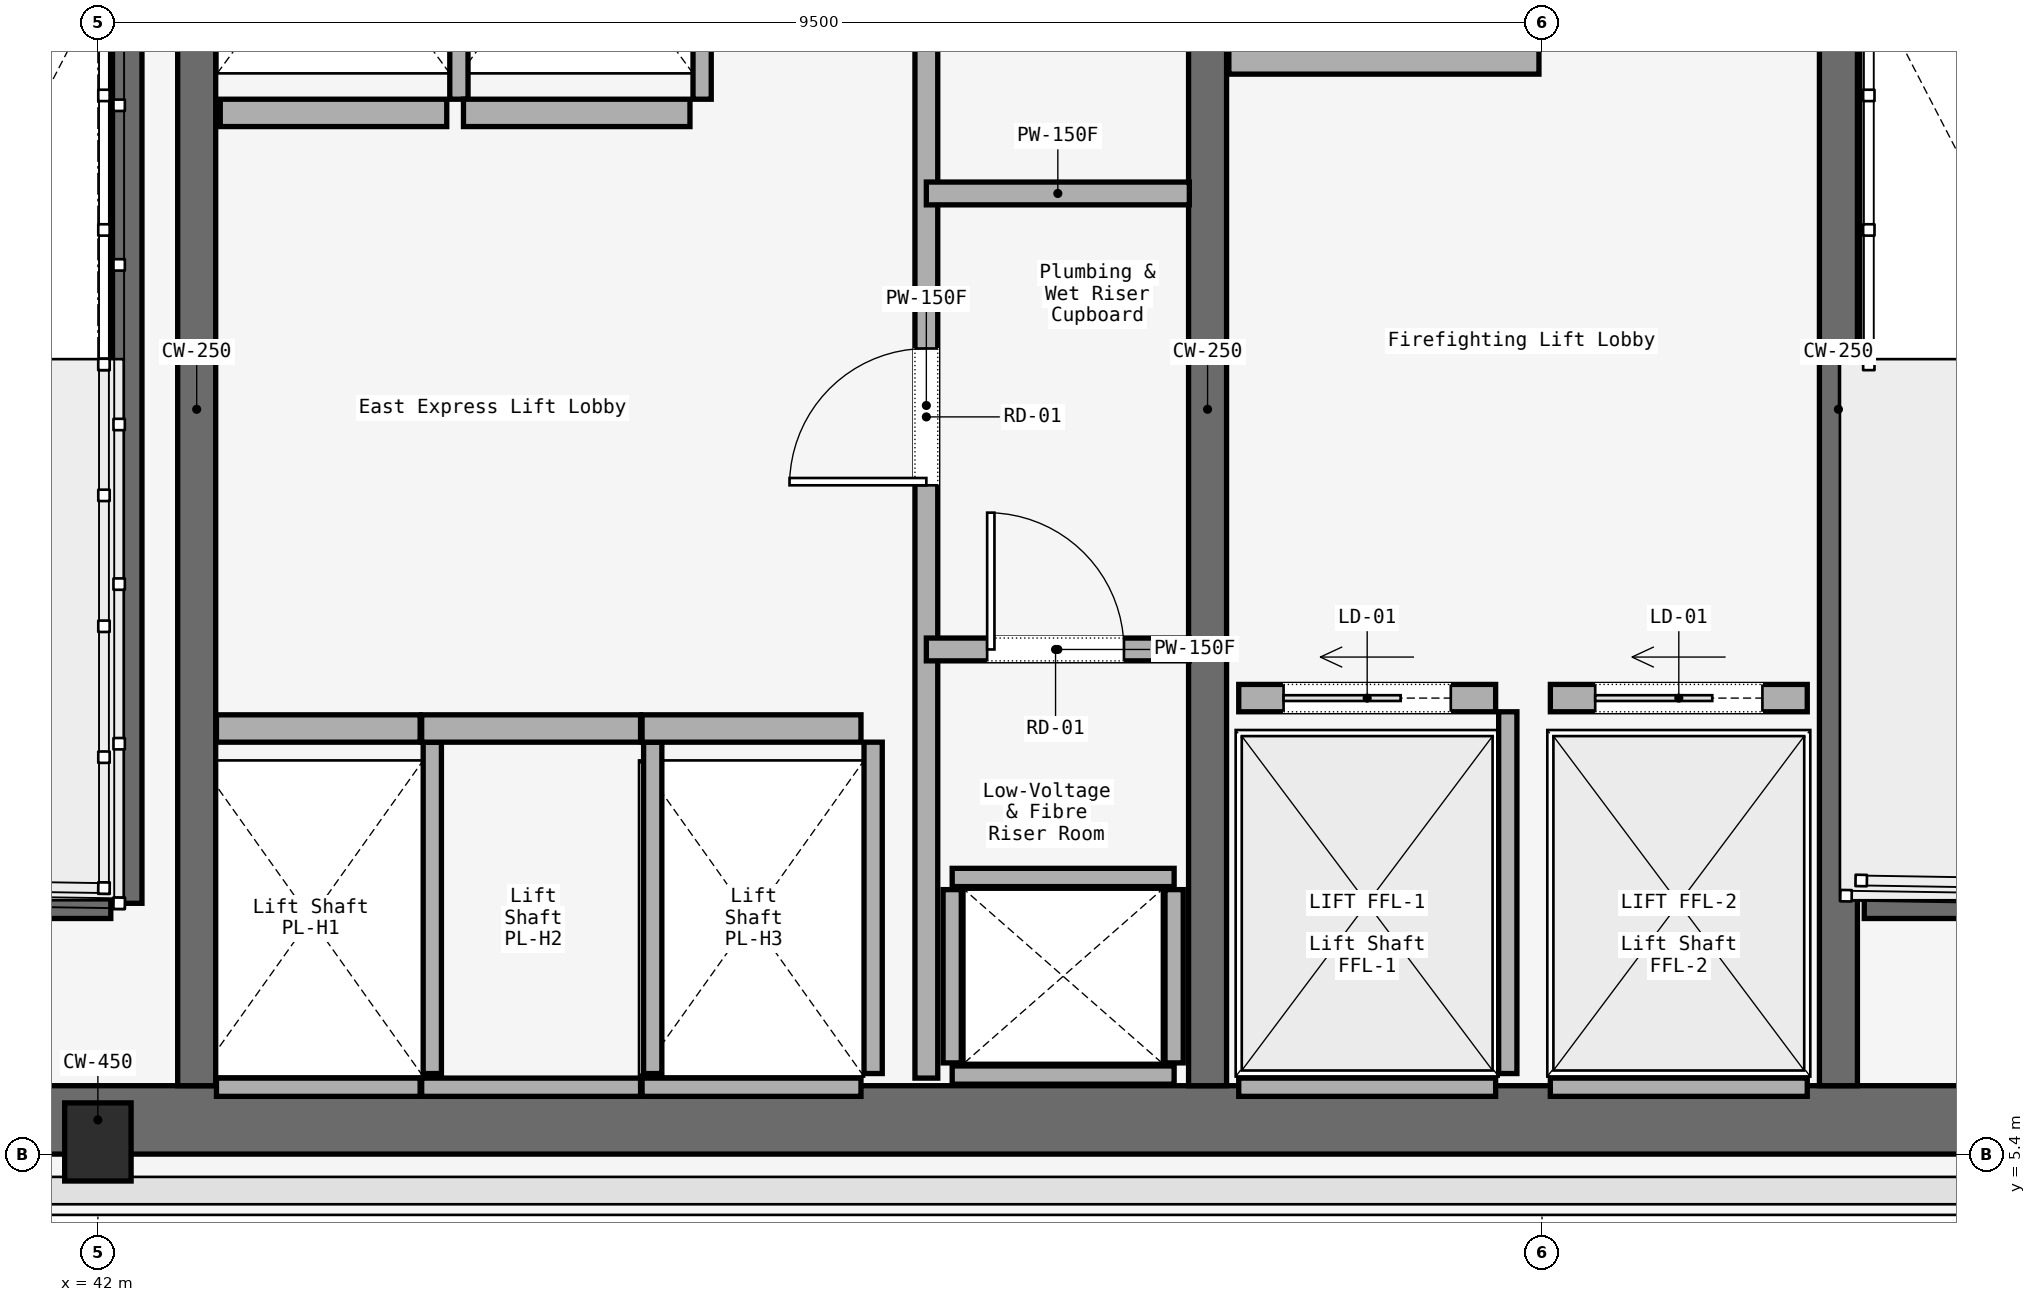
"""IFC4 building model, lengths in metres.
Left out: names, types, materials, properties, quantities, classifications, styles, units other than length and angle.
Written with IfcOpenShell. Run it as: python <this file> out.ifc"""

import sys

from ifc_helpers import new_model, si_unit, direction, frame, frame_2d, origin, origin_2d, place, context, subcontext, project, spatial, rectangle, i_section, extrude, element, fill, save


model = new_model("IFC4")
c1 = context("Model", 3, precision=1e-05, world=origin(), true_north=direction((0.0, 1.0)))
c2 = subcontext(c1, "Body", "Model", "MODEL_VIEW")
j1 = project(units=[si_unit("LENGTHUNIT", "METRE"), si_unit("PLANEANGLEUNIT", "RADIAN")], contexts=[c1])
p1 = place(None, origin())
s1 = spatial("IfcSite", under=j1, at=p1, CompositionType="ELEMENT")
p2 = place(p1, origin())
s2 = spatial("IfcBuilding", under=s1, at=p2, CompositionType="ELEMENT")
p3 = place(p2, frame((0.0, 0.0, 70.2)))
s3 = spatial("IfcBuildingStorey", under=s2, at=p3, CompositionType="ELEMENT", Elevation=70.2)
p4 = place(p3, frame((26.45, 5.625, 0.0), z_axis=(0.0, 0.0, 1.0), x_axis=(1.0, 0.0, 0.0)))
e1 = element("IfcWall", 1, at=p4, inside=s3, PredefinedType="SOLIDWALL", context=c2, shape_type="SweptSolid", body=[
    extrude(rectangle(XDim=31.1, YDim=0.45, at=frame_2d((15.55, 0.0))), origin(), (0.0, 0.0, 1.0), 3.58),
])
for number, where, z_axis, x_axis in (
    (2, (42.65, 5.85, 0.0), (0.0, 0.0, 1.0), (0.0, 1.0, 0.0)),
    (3, (49.3, 5.85, 0.0), (0.0, 0.0, 1.0), (0.0, 1.0, 0.0)),
):
    element("IfcWall", number, at=place(p3, frame(where, z_axis=z_axis, x_axis=x_axis)), inside=s3, PredefinedType="SOLIDWALL", context=c2, shape_type="SweptSolid", body=[
        extrude(rectangle(XDim=8.9, YDim=0.25, at=frame_2d((4.45, 0.0))), origin(), (0.0, 0.0, 1.0), 3.58),
    ])
p5 = place(p3, frame((53.45, 5.85, 0.0), z_axis=(0.0, 0.0, 1.0), x_axis=(0.0, 1.0, 0.0)))
e4 = element("IfcWall", 4, at=p5, inside=s3, PredefinedType="SOLIDWALL", context=c2, shape_type="SweptSolid", body=[
    extrude(rectangle(XDim=8.9, YDim=0.25, at=frame_2d((4.45, 0.0))), origin(), (0.0, 0.0, 1.0), 3.58),
])
p6 = place(p5, frame((7.45, 0.0, 0.0)))
e5 = element("IfcOpeningElement", 5, at=p6, cuts=e4, PredefinedType="OPENING", context=c2, shape_type="SweptSolid", body=[
    extrude(rectangle(XDim=1.1, YDim=2.2, at=frame_2d((0.55, 1.1))), frame((0.0, 0.125, 0.0), z_axis=(0.0, -1.0, 0.0), x_axis=(1.0, 0.0, 0.0)), (0.0, 0.0, 1.0), 0.25),
])
p7 = place(p3, frame((42.0, 5.48, 0.0), z_axis=(0.0, 0.0, 1.0), x_axis=(1.0, 0.0, 0.0)))
e6 = element("IfcColumn", 6, at=p7, inside=s3, PredefinedType="COLUMN", context=c2, shape_type="SweptSolid", body=[
    extrude(i_section(OverallWidth=0.437, OverallDepth=0.514, WebThickness=0.061, FlangeThickness=0.077, FilletRadius=0.015, at=origin_2d()), origin(), (0.0, 0.0, 1.0), 3.58),
])
p8 = place(p3, frame((42.19, 14.7, 0.0), z_axis=(0.0, 0.0, 1.0), x_axis=(0.0, -1.0, 0.0)))
e7 = element("IfcWall", 7, at=p8, inside=s3, PredefinedType="SOLIDWALL", context=c2, shape_type="SweptSolid", body=[
    extrude(rectangle(XDim=7.65, YDim=0.2, at=frame_2d((3.825, 0.0))), origin(), (0.0, 0.0, 1.0), 3.8),
])
for number, where, z_axis, x_axis in (
    (8, (38.97, 7.05, 0.0), (0.0, 0.0, 1.0), (1.0, 0.0, 0.0)),
    (9, (53.62, 7.05, 0.0), (0.0, 0.0, 1.0), (1.0, 0.0, 0.0)),
):
    element("IfcWall", number, at=place(p3, frame(where, z_axis=z_axis, x_axis=x_axis)), inside=s3, PredefinedType="SOLIDWALL", context=c2, shape_type="SweptSolid", body=[
        extrude(rectangle(XDim=3.115, YDim=0.2, at=frame_2d((1.558, 0.0))), origin(), (0.0, 0.0, 1.0), 3.8),
    ])
for number, where, z_axis, x_axis in (
    (10, (47.62, 5.92, 0.0), (0.0, 0.0, 1.0), (1.0, 0.0, 0.0)),
    (11, (47.62, 7.22, 0.0), (0.0, 0.0, 1.0), (1.0, 0.0, 0.0)),
):
    element("IfcWall", number, at=place(p3, frame(where, z_axis=z_axis, x_axis=x_axis)), inside=s3, PredefinedType="SOLIDWALL", context=c2, shape_type="SweptSolid", body=[
        extrude(rectangle(XDim=1.46, YDim=0.12, at=frame_2d((0.73, 0.0))), origin(), (0.0, 0.0, 1.0), 2.95),
    ])
for number, where, z_axis, x_axis in (
    (12, (47.62, 6.0, 0.0), (0.0, 0.0, 1.0), (0.0, 1.0, 0.0)),
    (13, (49.08, 6.0, 0.0), (0.0, 0.0, 1.0), (0.0, 1.0, 0.0)),
):
    element("IfcWall", number, at=place(p3, frame(where, z_axis=z_axis, x_axis=x_axis)), inside=s3, PredefinedType="SOLIDWALL", context=c2, shape_type="SweptSolid", body=[
        extrude(rectangle(XDim=1.14, YDim=0.12, at=frame_2d((0.57, 0.0))), origin(), (0.0, 0.0, 1.0), 2.95),
    ])
p9 = place(p3, frame((47.45, 5.9, 0.0), z_axis=(0.0, 0.0, 1.0), x_axis=(0.0, 1.0, 0.0)))
e14 = element("IfcWall", 14, at=p9, inside=s3, PredefinedType="PARTITIONING", context=c2, shape_type="SweptSolid", body=[
    extrude(rectangle(XDim=8.85, YDim=0.15, at=frame_2d((4.425, 0.0))), origin(), (0.0, 0.0, 1.0), 2.95),
])
p10 = place(p9, frame((3.9, 0.0, 0.0)))
e15 = element("IfcOpeningElement", 15, at=p10, cuts=e14, PredefinedType="OPENING", context=c2, shape_type="SweptSolid", body=[
    extrude(rectangle(XDim=0.9, YDim=2.1, at=frame_2d((0.45, 1.05))), frame((0.0, 0.075, 0.0), z_axis=(0.0, -1.0, 0.0), x_axis=(1.0, 0.0, 0.0)), (0.0, 0.0, 1.0), 0.15),
])
p11 = place(p3, frame((47.45, 8.72, 0.0), z_axis=(0.0, 0.0, 1.0), x_axis=(1.0, 0.0, 0.0)))
e16 = element("IfcWall", 16, at=p11, inside=s3, PredefinedType="PARTITIONING", context=c2, shape_type="SweptSolid", body=[
    extrude(rectangle(XDim=1.73, YDim=0.15, at=frame_2d((0.865, 0.0))), origin(), (0.0, 0.0, 1.0), 2.95),
])
p12 = place(p11, frame((0.4, 0.0, 0.0)))
e17 = element("IfcOpeningElement", 17, at=p12, cuts=e16, PredefinedType="OPENING", context=c2, shape_type="SweptSolid", body=[
    extrude(rectangle(XDim=0.9, YDim=2.1, at=frame_2d((0.45, 1.05))), frame((0.0, 0.075, 0.0), z_axis=(0.0, -1.0, 0.0), x_axis=(1.0, 0.0, 0.0)), (0.0, 0.0, 1.0), 0.15),
])
p13 = place(p3, frame((47.45, 11.72, 0.0), z_axis=(0.0, 0.0, 1.0), x_axis=(1.0, 0.0, 0.0)))
e18 = element("IfcWall", 18, at=p13, inside=s3, PredefinedType="PARTITIONING", context=c2, shape_type="SweptSolid", body=[
    extrude(rectangle(XDim=1.73, YDim=0.15, at=frame_2d((0.865, 0.0))), origin(), (0.0, 0.0, 1.0), 2.95),
])
p14 = place(p3, frame((42.78, 8.2, 0.0), z_axis=(0.0, 0.0, 1.0), x_axis=(1.0, 0.0, 0.0)))
e19 = element("IfcWall", 19, at=p14, inside=s3, PredefinedType="SOLIDWALL", context=c2, shape_type="SweptSolid", body=[
    extrude(rectangle(XDim=1.34, YDim=0.18, at=frame_2d((0.67, 0.0))), origin(), (0.0, 0.0, 1.0), 2.95),
])
p15 = place(p3, frame((42.78, 5.84, 0.0), z_axis=(0.0, 0.0, 1.0), x_axis=(1.0, 0.0, 0.0)))
e20 = element("IfcWall", 20, at=p15, inside=s3, PredefinedType="SOLIDWALL", context=c2, shape_type="SweptSolid", body=[
    extrude(rectangle(XDim=1.34, YDim=0.12, at=frame_2d((0.67, 0.0))), origin(), (0.0, 0.0, 1.0), 2.95),
])
p16 = place(p3, frame((44.2, 5.93, 0.0), z_axis=(0.0, 0.0, 1.0), x_axis=(0.0, 1.0, 0.0)))
e21 = element("IfcWall", 21, at=p16, inside=s3, PredefinedType="SOLIDWALL", context=c2, shape_type="SweptSolid", body=[
    extrude(rectangle(XDim=2.18, YDim=0.12, at=frame_2d((1.09, 0.0))), origin(), (0.0, 0.0, 1.0), 2.95),
])
p17 = place(p3, frame((44.13, 8.2, 0.0), z_axis=(0.0, 0.0, 1.0), x_axis=(1.0, 0.0, 0.0)))
e22 = element("IfcWall", 22, at=p17, inside=s3, PredefinedType="SOLIDWALL", context=c2, shape_type="SweptSolid", body=[
    extrude(rectangle(XDim=1.44, YDim=0.18, at=frame_2d((0.72, 0.0))), origin(), (0.0, 0.0, 1.0), 2.95),
])
p18 = place(p3, frame((44.13, 5.84, 0.0), z_axis=(0.0, 0.0, 1.0), x_axis=(1.0, 0.0, 0.0)))
e23 = element("IfcWall", 23, at=p18, inside=s3, PredefinedType="SOLIDWALL", context=c2, shape_type="SweptSolid", body=[
    extrude(rectangle(XDim=1.44, YDim=0.12, at=frame_2d((0.72, 0.0))), origin(), (0.0, 0.0, 1.0), 2.95),
])
p19 = place(p3, frame((45.65, 5.93, 0.0), z_axis=(0.0, 0.0, 1.0), x_axis=(0.0, 1.0, 0.0)))
e24 = element("IfcWall", 24, at=p19, inside=s3, PredefinedType="SOLIDWALL", context=c2, shape_type="SweptSolid", body=[
    extrude(rectangle(XDim=2.18, YDim=0.12, at=frame_2d((1.09, 0.0))), origin(), (0.0, 0.0, 1.0), 2.95),
])
p20 = place(p3, frame((45.58, 8.2, 0.0), z_axis=(0.0, 0.0, 1.0), x_axis=(1.0, 0.0, 0.0)))
e25 = element("IfcWall", 25, at=p20, inside=s3, PredefinedType="SOLIDWALL", context=c2, shape_type="SweptSolid", body=[
    extrude(rectangle(XDim=1.44, YDim=0.18, at=frame_2d((0.72, 0.0))), origin(), (0.0, 0.0, 1.0), 2.95),
])
p21 = place(p3, frame((45.58, 5.84, 0.0), z_axis=(0.0, 0.0, 1.0), x_axis=(1.0, 0.0, 0.0)))
e26 = element("IfcWall", 26, at=p21, inside=s3, PredefinedType="SOLIDWALL", context=c2, shape_type="SweptSolid", body=[
    extrude(rectangle(XDim=1.44, YDim=0.12, at=frame_2d((0.72, 0.0))), origin(), (0.0, 0.0, 1.0), 2.95),
])
p22 = place(p3, frame((47.1, 5.93, 0.0), z_axis=(0.0, 0.0, 1.0), x_axis=(0.0, 1.0, 0.0)))
e27 = element("IfcWall", 27, at=p22, inside=s3, PredefinedType="SOLIDWALL", context=c2, shape_type="SweptSolid", body=[
    extrude(rectangle(XDim=2.18, YDim=0.12, at=frame_2d((1.09, 0.0))), origin(), (0.0, 0.0, 1.0), 2.95),
])
p23 = place(p3, frame((42.805, 12.25, 0.0), z_axis=(0.0, 0.0, 1.0), x_axis=(1.0, 0.0, 0.0)))
e28 = element("IfcWall", 28, at=p23, inside=s3, PredefinedType="SOLIDWALL", context=c2, shape_type="SweptSolid", body=[
    extrude(rectangle(XDim=1.49, YDim=0.18, at=frame_2d((0.745, 0.0))), origin(), (0.0, 0.0, 1.0), 2.95),
])
p24 = place(p3, frame((44.375, 12.34, 0.0), z_axis=(0.0, 0.0, 1.0), x_axis=(0.0, 1.0, 0.0)))
e29 = element("IfcWall", 29, at=p24, inside=s3, PredefinedType="SOLIDWALL", context=c2, shape_type="SweptSolid", body=[
    extrude(rectangle(XDim=2.23, YDim=0.12, at=frame_2d((1.115, 0.0))), origin(), (0.0, 0.0, 1.0), 2.95),
])
p25 = place(p3, frame((44.405, 12.25, 0.0), z_axis=(0.0, 0.0, 1.0), x_axis=(1.0, 0.0, 0.0)))
e30 = element("IfcWall", 30, at=p25, inside=s3, PredefinedType="SOLIDWALL", context=c2, shape_type="SweptSolid", body=[
    extrude(rectangle(XDim=1.49, YDim=0.18, at=frame_2d((0.745, 0.0))), origin(), (0.0, 0.0, 1.0), 2.95),
])
p26 = place(p3, frame((45.975, 12.34, 0.0), z_axis=(0.0, 0.0, 1.0), x_axis=(0.0, 1.0, 0.0)))
e31 = element("IfcWall", 31, at=p26, inside=s3, PredefinedType="SOLIDWALL", context=c2, shape_type="SweptSolid", body=[
    extrude(rectangle(XDim=2.23, YDim=0.12, at=frame_2d((1.115, 0.0))), origin(), (0.0, 0.0, 1.0), 2.95),
])
p27 = place(p3, frame((49.505, 8.4, 0.0), z_axis=(0.0, 0.0, 1.0), x_axis=(1.0, 0.0, 0.0)))
e32 = element("IfcWall", 32, at=p27, inside=s3, PredefinedType="SOLIDWALL", context=c2, shape_type="SweptSolid", body=[
    extrude(rectangle(XDim=1.69, YDim=0.18, at=frame_2d((0.845, 0.0))), origin(), (0.0, 0.0, 1.0), 2.95),
])
p28 = place(p27, frame((0.295, 0.0, 0.0)))
e33 = element("IfcOpeningElement", 33, at=p28, cuts=e32, PredefinedType="OPENING", context=c2, shape_type="SweptSolid", body=[
    extrude(rectangle(XDim=1.1, YDim=2.2, at=frame_2d((0.55, 1.1))), frame((0.0, 0.09, 0.0), z_axis=(0.0, -1.0, 0.0), x_axis=(1.0, 0.0, 0.0)), (0.0, 0.0, 1.0), 0.18),
])
p29 = place(p3, frame((49.505, 5.84, 0.0), z_axis=(0.0, 0.0, 1.0), x_axis=(1.0, 0.0, 0.0)))
e34 = element("IfcWall", 34, at=p29, inside=s3, PredefinedType="SOLIDWALL", context=c2, shape_type="SweptSolid", body=[
    extrude(rectangle(XDim=1.69, YDim=0.12, at=frame_2d((0.845, 0.0))), origin(), (0.0, 0.0, 1.0), 2.95),
])
p30 = place(p3, frame((51.275, 5.93, 0.0), z_axis=(0.0, 0.0, 1.0), x_axis=(0.0, 1.0, 0.0)))
e35 = element("IfcWall", 35, at=p30, inside=s3, PredefinedType="SOLIDWALL", context=c2, shape_type="SweptSolid", body=[
    extrude(rectangle(XDim=2.38, YDim=0.12, at=frame_2d((1.19, 0.0))), origin(), (0.0, 0.0, 1.0), 2.95),
])
p31 = place(p3, frame((51.555, 8.4, 0.0), z_axis=(0.0, 0.0, 1.0), x_axis=(1.0, 0.0, 0.0)))
e36 = element("IfcWall", 36, at=p31, inside=s3, PredefinedType="SOLIDWALL", context=c2, shape_type="SweptSolid", body=[
    extrude(rectangle(XDim=1.69, YDim=0.18, at=frame_2d((0.845, 0.0))), origin(), (0.0, 0.0, 1.0), 2.95),
])
p32 = place(p31, frame((0.295, 0.0, 0.0)))
e37 = element("IfcOpeningElement", 37, at=p32, cuts=e36, PredefinedType="OPENING", context=c2, shape_type="SweptSolid", body=[
    extrude(rectangle(XDim=1.1, YDim=2.2, at=frame_2d((0.55, 1.1))), frame((0.0, 0.09, 0.0), z_axis=(0.0, -1.0, 0.0), x_axis=(1.0, 0.0, 0.0)), (0.0, 0.0, 1.0), 0.18),
])
p33 = place(p3, frame((51.555, 5.84, 0.0), z_axis=(0.0, 0.0, 1.0), x_axis=(1.0, 0.0, 0.0)))
e38 = element("IfcWall", 38, at=p33, inside=s3, PredefinedType="SOLIDWALL", context=c2, shape_type="SweptSolid", body=[
    extrude(rectangle(XDim=1.69, YDim=0.12, at=frame_2d((0.845, 0.0))), origin(), (0.0, 0.0, 1.0), 2.95),
])
p34 = place(p3, frame((49.44, 12.595, 0.0), z_axis=(0.0, 0.0, 1.0), x_axis=(1.0, 0.0, 0.0)))
e39 = element("IfcWall", 39, at=p34, inside=s3, PredefinedType="SOLIDWALL", context=c2, shape_type="SweptSolid", body=[
    extrude(rectangle(XDim=2.04, YDim=0.18, at=frame_2d((1.02, 0.0))), origin(), (0.0, 0.0, 1.0), 2.95),
])
p35 = place(p10, origin())
e40 = element("IfcDoor", 40, at=p35, inside=s3, OperationType="SINGLE_SWING_LEFT", PredefinedType="DOOR", context=c2, shape_type="SweptSolid", body=[
    extrude(rectangle(XDim=0.9, YDim=2.1, at=frame_2d((0.45, 1.05))), frame((0.0, 0.025, 0.0), z_axis=(0.0, -1.0, 0.0), x_axis=(1.0, 0.0, 0.0)), (0.0, 0.0, 1.0), 0.05),
])
fill(e15, e40)
p36 = place(p12, origin())
e41 = element("IfcDoor", 41, at=p36, inside=s3, OperationType="SINGLE_SWING_RIGHT", PredefinedType="DOOR", context=c2, shape_type="SweptSolid", body=[
    extrude(rectangle(XDim=0.9, YDim=2.1, at=frame_2d((0.45, 1.05))), frame((0.0, 0.025, 0.0), z_axis=(0.0, -1.0, 0.0), x_axis=(1.0, 0.0, 0.0)), (0.0, 0.0, 1.0), 0.05),
])
fill(e17, e41)
p37 = place(p28, origin())
e42 = element("IfcDoor", 42, at=p37, inside=s3, OperationType="SLIDING_TO_LEFT", PredefinedType="DOOR", context=c2, shape_type="SweptSolid", body=[
    extrude(rectangle(XDim=1.1, YDim=2.2, at=frame_2d((0.55, 1.1))), frame((0.0, 0.025, 0.0), z_axis=(0.0, -1.0, 0.0), x_axis=(1.0, 0.0, 0.0)), (0.0, 0.0, 1.0), 0.05),
])
fill(e33, e42)
p38 = place(p32, origin())
e43 = element("IfcDoor", 43, at=p38, inside=s3, OperationType="SLIDING_TO_LEFT", PredefinedType="DOOR", context=c2, shape_type="SweptSolid", body=[
    extrude(rectangle(XDim=1.1, YDim=2.2, at=frame_2d((0.55, 1.1))), frame((0.0, 0.025, 0.0), z_axis=(0.0, -1.0, 0.0), x_axis=(1.0, 0.0, 0.0)), (0.0, 0.0, 1.0), 0.05),
])
fill(e37, e43)
save(model, sys.argv[1])
